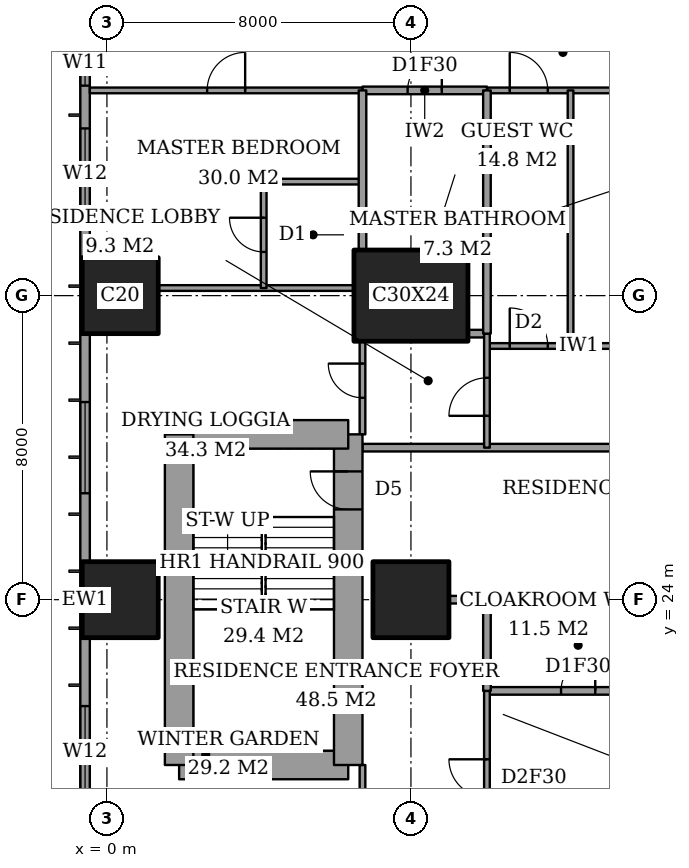
"""IFC4 building model, lengths in metres.
Left out: names, types, materials, properties, quantities, classifications, styles, units other than length and angle.
Written with IfcOpenShell. Run it as: python <this file> out.ifc"""

import sys

from ifc_helpers import new_model, si_unit, direction, frame, frame_2d, origin, origin_2d, place, context, subcontext, project, spatial, rectangle, extrude, element, fill, save


model = new_model("IFC4")
c1 = context("Model", 3, precision=1e-05, world=origin(), true_north=direction((0.0, 1.0)))
c2 = subcontext(c1, "Body", "Model", "MODEL_VIEW")
j1 = project(units=[si_unit("LENGTHUNIT", "METRE"), si_unit("PLANEANGLEUNIT", "RADIAN")], contexts=[c1])
p1 = place(None, origin())
s1 = spatial("IfcSite", under=j1, at=p1, CompositionType="ELEMENT")
p2 = place(p1, origin())
s2 = spatial("IfcBuilding", under=s1, at=p2, CompositionType="ELEMENT")
p3 = place(p2, frame((0.0, 0.0, 135.8)))
s3 = spatial("IfcBuildingStorey", under=s2, at=p3, CompositionType="ELEMENT", Elevation=135.8)
for number, where, z_axis, x_axis in (
    (1, (0.35, 24.0, 0.0), (0.0, 0.0, 1.0), (1.0, 0.0, 0.0)),
    (2, (0.35, 32.0, 0.0), (0.0, 0.0, 1.0), (1.0, 0.0, 0.0)),
    (3, (8.0, 24.0, 0.0), (0.0, 0.0, 1.0), (1.0, 0.0, 0.0)),
):
    element("IfcColumn", number, at=place(p3, frame(where, z_axis=z_axis, x_axis=x_axis)), inside=s3, PredefinedType="COLUMN", context=c2, shape_type="SweptSolid", body=[
        extrude(rectangle(XDim=2.0, YDim=2.0, at=origin_2d()), origin(), (0.0, 0.0, 1.0), 3.6),
    ])
p4 = place(p3, frame((8.0, 32.0, 0.0), z_axis=(0.0, 0.0, 1.0), x_axis=(1.0, 0.0, 0.0)))
e4 = element("IfcColumn", 4, at=p4, inside=s3, PredefinedType="COLUMN", context=c2, shape_type="SweptSolid", body=[
    extrude(rectangle(XDim=3.0, YDim=2.4, at=origin_2d()), origin(), (0.0, 0.0, 1.0), 3.6),
])
p5 = place(p3, frame((1.9, 19.65, 0.0), z_axis=(0.0, 0.0, 1.0), x_axis=(1.0, 0.0, 0.0)))
e5 = element("IfcWall", 5, at=p5, inside=s3, PredefinedType="SHEAR", context=c2, shape_type="SweptSolid", body=[
    extrude(rectangle(XDim=4.45, YDim=0.75, at=frame_2d((2.225, 0.0))), origin(), (0.0, 0.0, 1.0), 3.6),
])
p6 = place(p3, frame((6.35, 19.65, 0.0), z_axis=(0.0, 0.0, 1.0), x_axis=(0.0, 1.0, 0.0)))
e6 = element("IfcWall", 6, at=p6, inside=s3, PredefinedType="SHEAR", context=c2, shape_type="SweptSolid", body=[
    extrude(rectangle(XDim=8.7, YDim=0.75, at=frame_2d((4.35, 0.0))), origin(), (0.0, 0.0, 1.0), 3.6),
])
p7 = place(p6, frame((6.725, 0.0, 0.0)))
e7 = element("IfcOpeningElement", 7, at=p7, cuts=e6, PredefinedType="OPENING", context=c2, shape_type="SweptSolid", body=[
    extrude(rectangle(XDim=1.0, YDim=2.1, at=frame_2d((0.5, 1.05))), frame((0.0, 0.385, 0.0), z_axis=(0.0, -1.0, 0.0), x_axis=(1.0, 0.0, 0.0)), (0.0, 0.0, 1.0), 0.77),
])
p8 = place(p3, frame((6.35, 28.35, 0.0), z_axis=(0.0, 0.0, 1.0), x_axis=(-1.0, 0.0, 0.0)))
e8 = element("IfcWall", 8, at=p8, inside=s3, PredefinedType="SHEAR", context=c2, shape_type="SweptSolid", body=[
    extrude(rectangle(XDim=4.45, YDim=0.75, at=frame_2d((2.225, 0.0))), origin(), (0.0, 0.0, 1.0), 3.6),
])
p9 = place(p3, frame((1.9, 28.35, 0.0), z_axis=(0.0, 0.0, 1.0), x_axis=(0.0, -1.0, 0.0)))
e9 = element("IfcWall", 9, at=p9, inside=s3, PredefinedType="SHEAR", context=c2, shape_type="SweptSolid", body=[
    extrude(rectangle(XDim=8.7, YDim=0.75, at=frame_2d((4.35, 0.0))), origin(), (0.0, 0.0, 1.0), 3.6),
])
p10 = place(p3, frame((-0.575, 44.825, 0.0), z_axis=(0.0, 0.0, 1.0), x_axis=(0.0, -1.0, 0.0)))
e10 = element("IfcWall", 10, at=p10, inside=s3, PredefinedType="SOLIDWALL", context=c2, shape_type="SweptSolid", body=[
    extrude(rectangle(XDim=41.65, YDim=0.25, at=frame_2d((20.825, 0.0))), origin(), (0.0, 0.0, 1.0), 3.6),
])
p11 = place(p10, frame((0.775, 0.0, 0.4)))
e11 = element("IfcOpeningElement", 11, at=p11, cuts=e10, PredefinedType="OPENING", context=c2, shape_type="SweptSolid", body=[
    extrude(rectangle(XDim=2.4, YDim=2.2, at=frame_2d((1.2, 1.1))), frame((0.0, 0.135, 0.0), z_axis=(0.0, -1.0, 0.0), x_axis=(1.0, 0.0, 0.0)), (0.0, 0.0, 1.0), 0.27),
])
p12 = place(p10, frame((6.1, 0.0, 0.4)))
e12 = element("IfcOpeningElement", 12, at=p12, cuts=e10, PredefinedType="OPENING", context=c2, shape_type="SweptSolid", body=[
    extrude(rectangle(XDim=1.2, YDim=2.2, at=frame_2d((0.6, 1.1))), frame((0.0, 0.135, 0.0), z_axis=(0.0, -1.0, 0.0), x_axis=(1.0, 0.0, 0.0)), (0.0, 0.0, 1.0), 0.27),
])
p13 = place(p10, frame((8.425, 0.0, 0.4)))
e13 = element("IfcOpeningElement", 13, at=p13, cuts=e10, PredefinedType="OPENING", context=c2, shape_type="SweptSolid", body=[
    extrude(rectangle(XDim=2.4, YDim=2.2, at=frame_2d((1.2, 1.1))), frame((0.0, 0.135, 0.0), z_axis=(0.0, -1.0, 0.0), x_axis=(1.0, 0.0, 0.0)), (0.0, 0.0, 1.0), 0.27),
])
p14 = place(p10, frame((15.625, 0.0, 0.4)))
e14 = element("IfcOpeningElement", 14, at=p14, cuts=e10, PredefinedType="OPENING", context=c2, shape_type="SweptSolid", body=[
    extrude(rectangle(XDim=2.4, YDim=2.2, at=frame_2d((1.2, 1.1))), frame((0.0, 0.135, 0.0), z_axis=(0.0, -1.0, 0.0), x_axis=(1.0, 0.0, 0.0)), (0.0, 0.0, 1.0), 0.27),
])
p15 = place(p10, frame((23.625, 0.0, 0.4)))
e15 = element("IfcOpeningElement", 15, at=p15, cuts=e10, PredefinedType="OPENING", context=c2, shape_type="SweptSolid", body=[
    extrude(rectangle(XDim=2.4, YDim=2.2, at=frame_2d((1.2, 1.1))), frame((0.0, 0.135, 0.0), z_axis=(0.0, -1.0, 0.0), x_axis=(1.0, 0.0, 0.0)), (0.0, 0.0, 1.0), 0.27),
])
p16 = place(p10, frame((30.825, 0.0, 0.4)))
e16 = element("IfcOpeningElement", 16, at=p16, cuts=e10, PredefinedType="OPENING", context=c2, shape_type="SweptSolid", body=[
    extrude(rectangle(XDim=2.4, YDim=2.2, at=frame_2d((1.2, 1.1))), frame((0.0, 0.135, 0.0), z_axis=(0.0, -1.0, 0.0), x_axis=(1.0, 0.0, 0.0)), (0.0, 0.0, 1.0), 0.27),
])
p17 = place(p10, frame((34.5, 0.0, 0.4)))
e17 = element("IfcOpeningElement", 17, at=p17, cuts=e10, PredefinedType="OPENING", context=c2, shape_type="SweptSolid", body=[
    extrude(rectangle(XDim=1.2, YDim=2.2, at=frame_2d((0.6, 1.1))), frame((0.0, 0.135, 0.0), z_axis=(0.0, -1.0, 0.0), x_axis=(1.0, 0.0, 0.0)), (0.0, 0.0, 1.0), 0.27),
])
p18 = place(p10, frame((38.475, 0.0, 0.4)))
e18 = element("IfcOpeningElement", 18, at=p18, cuts=e10, PredefinedType="OPENING", context=c2, shape_type="SweptSolid", body=[
    extrude(rectangle(XDim=2.4, YDim=2.2, at=frame_2d((1.2, 1.1))), frame((0.0, 0.135, 0.0), z_axis=(0.0, -1.0, 0.0), x_axis=(1.0, 0.0, 0.0)), (0.0, 0.0, 1.0), 0.27),
])
p19 = place(p3, frame((10.0, 21.6, 0.0), z_axis=(0.0, 0.0, 1.0), x_axis=(1.0, 0.0, 0.0)))
e19 = element("IfcWall", 19, at=p19, inside=s3, PredefinedType="PARTITIONING", context=c2, shape_type="SweptSolid", body=[
    extrude(rectangle(XDim=4.8, YDim=0.2, at=frame_2d((2.4, 0.0))), origin(), (0.0, 0.0, 1.0), 3.35),
])
p20 = place(p19, frame((1.95, 0.0, 0.0)))
e20 = element("IfcOpeningElement", 20, at=p20, cuts=e19, PredefinedType="OPENING", context=c2, shape_type="SweptSolid", body=[
    extrude(rectangle(XDim=0.9, YDim=2.1, at=frame_2d((0.45, 1.05))), frame((0.0, 0.11, 0.0), z_axis=(0.0, -1.0, 0.0), x_axis=(1.0, 0.0, 0.0)), (0.0, 0.0, 1.0), 0.22),
])
p21 = place(p3, frame((9.0, 24.0, 0.0), z_axis=(0.0, 0.0, 1.0), x_axis=(1.0, 0.0, 0.0)))
e21 = element("IfcWall", 21, at=p21, inside=s3, PredefinedType="PARTITIONING", context=c2, shape_type="SweptSolid", body=[
    extrude(rectangle(XDim=6.0, YDim=0.2, at=frame_2d((3.0, 0.0))), origin(), (0.0, 0.0, 1.0), 3.35),
])
p22 = place(p3, frame((6.725, 28.0, 0.0), z_axis=(0.0, 0.0, 1.0), x_axis=(1.0, 0.0, 0.0)))
e22 = element("IfcWall", 22, at=p22, inside=s3, PredefinedType="PARTITIONING", context=c2, shape_type="SweptSolid", body=[
    extrude(rectangle(XDim=17.275, YDim=0.2, at=frame_2d((8.637, 0.0))), origin(), (0.0, 0.0, 1.0), 3.35),
])
p23 = place(p22, frame((6.675, 0.0, 0.0)))
e23 = element("IfcOpeningElement", 23, at=p23, cuts=e22, PredefinedType="OPENING", context=c2, shape_type="SweptSolid", body=[
    extrude(rectangle(XDim=1.2, YDim=2.4, at=frame_2d((0.6, 1.2))), frame((0.0, 0.11, 0.0), z_axis=(0.0, -1.0, 0.0), x_axis=(1.0, 0.0, 0.0)), (0.0, 0.0, 1.0), 0.22),
])
p24 = place(p3, frame((10.0, 30.675, 0.0), z_axis=(0.0, 0.0, 1.0), x_axis=(1.0, 0.0, 0.0)))
e24 = element("IfcWall", 24, at=p24, inside=s3, PredefinedType="PARTITIONING", context=c2, shape_type="SweptSolid", body=[
    extrude(rectangle(XDim=4.4, YDim=0.15, at=frame_2d((2.2, 0.0))), origin(), (0.0, 0.0, 1.0), 3.35),
])
p25 = place(p24, frame((0.6, 0.0, 0.0)))
e25 = element("IfcOpeningElement", 25, at=p25, cuts=e24, PredefinedType="OPENING", context=c2, shape_type="SweptSolid", body=[
    extrude(rectangle(XDim=1.0, YDim=2.1, at=frame_2d((0.5, 1.05))), frame((0.0, 0.085, 0.0), z_axis=(0.0, -1.0, 0.0), x_axis=(1.0, 0.0, 0.0)), (0.0, 0.0, 1.0), 0.17),
])
p26 = place(p3, frame((9.5, 31.0, 0.0), z_axis=(0.0, 0.0, 1.0), x_axis=(1.0, 0.0, 0.0)))
e26 = element("IfcWall", 26, at=p26, inside=s3, PredefinedType="PARTITIONING", context=c2, shape_type="SweptSolid", body=[
    extrude(rectangle(XDim=0.5, YDim=0.2, at=frame_2d((0.25, 0.0))), origin(), (0.0, 0.0, 1.0), 3.35),
])
p27 = place(p3, frame((1.35, 32.2, 0.0), z_axis=(0.0, 0.0, 1.0), x_axis=(1.0, 0.0, 0.0)))
e27 = element("IfcWall", 27, at=p27, inside=s3, PredefinedType="PARTITIONING", context=c2, shape_type="SweptSolid", body=[
    extrude(rectangle(XDim=5.15, YDim=0.15, at=frame_2d((2.575, 0.0))), origin(), (0.0, 0.0, 1.0), 3.35),
])
p28 = place(p3, frame((4.125, 35.0, 0.0), z_axis=(0.0, 0.0, 1.0), x_axis=(1.0, 0.0, 0.0)))
e28 = element("IfcWall", 28, at=p28, inside=s3, PredefinedType="PARTITIONING", context=c2, shape_type="SweptSolid", body=[
    extrude(rectangle(XDim=2.6, YDim=0.15, at=frame_2d((1.3, 0.0))), origin(), (0.0, 0.0, 1.0), 3.35),
])
p29 = place(p3, frame((6.725, 37.4, 0.0), z_axis=(0.0, 0.0, 1.0), x_axis=(1.0, 0.0, 0.0)))
e29 = element("IfcWall", 29, at=p29, inside=s3, PredefinedType="PARTITIONING", context=c2, shape_type="SweptSolid", body=[
    extrude(rectangle(XDim=3.275, YDim=0.2, at=frame_2d((1.637, 0.0))), origin(), (0.0, 0.0, 1.0), 3.35),
])
p30 = place(p29, frame((1.188, 0.0, 0.0)))
e30 = element("IfcOpeningElement", 30, at=p30, cuts=e29, PredefinedType="OPENING", context=c2, shape_type="SweptSolid", body=[
    extrude(rectangle(XDim=0.9, YDim=2.1, at=frame_2d((0.45, 1.05))), frame((0.0, 0.11, 0.0), z_axis=(0.0, -1.0, 0.0), x_axis=(1.0, 0.0, 0.0)), (0.0, 0.0, 1.0), 0.22),
])
p31 = place(p3, frame((-0.45, 37.4, 0.0), z_axis=(0.0, 0.0, 1.0), x_axis=(1.0, 0.0, 0.0)))
e31 = element("IfcWall", 31, at=p31, inside=s3, PredefinedType="PARTITIONING", context=c2, shape_type="SweptSolid", body=[
    extrude(rectangle(XDim=7.175, YDim=0.15, at=frame_2d((3.587, 0.0))), origin(), (0.0, 0.0, 1.0), 3.35),
])
p32 = place(p31, frame((3.087, 0.0, 0.0)))
e32 = element("IfcOpeningElement", 32, at=p32, cuts=e31, PredefinedType="OPENING", context=c2, shape_type="SweptSolid", body=[
    extrude(rectangle(XDim=1.0, YDim=2.1, at=frame_2d((0.5, 1.05))), frame((0.0, 0.085, 0.0), z_axis=(0.0, -1.0, 0.0), x_axis=(1.0, 0.0, 0.0)), (0.0, 0.0, 1.0), 0.17),
])
p33 = place(p3, frame((10.0, 37.4, 0.0), z_axis=(0.0, 0.0, 1.0), x_axis=(1.0, 0.0, 0.0)))
e33 = element("IfcWall", 33, at=p33, inside=s3, PredefinedType="PARTITIONING", context=c2, shape_type="SweptSolid", body=[
    extrude(rectangle(XDim=14.561, YDim=0.15, at=frame_2d((7.281, 0.0))), origin(), (0.0, 0.0, 1.0), 3.35),
])
p34 = place(p33, frame((0.6, 0.0, 0.0)))
e34 = element("IfcOpeningElement", 34, at=p34, cuts=e33, PredefinedType="OPENING", context=c2, shape_type="SweptSolid", body=[
    extrude(rectangle(XDim=1.0, YDim=2.1, at=frame_2d((0.5, 1.05))), frame((0.0, 0.085, 0.0), z_axis=(0.0, -1.0, 0.0), x_axis=(1.0, 0.0, 0.0)), (0.0, 0.0, 1.0), 0.17),
])
p35 = place(p33, frame((4.6, 0.0, 0.0)))
e35 = element("IfcOpeningElement", 35, at=p35, cuts=e33, PredefinedType="OPENING", context=c2, shape_type="SweptSolid", body=[
    extrude(rectangle(XDim=1.0, YDim=2.1, at=frame_2d((0.5, 1.05))), frame((0.0, 0.085, 0.0), z_axis=(0.0, -1.0, 0.0), x_axis=(1.0, 0.0, 0.0)), (0.0, 0.0, 1.0), 0.17),
])
p36 = place(p33, frame((10.725, 0.0, 0.0)))
e36 = element("IfcOpeningElement", 36, at=p36, cuts=e33, PredefinedType="OPENING", context=c2, shape_type="SweptSolid", body=[
    extrude(rectangle(XDim=1.0, YDim=2.1, at=frame_2d((0.5, 1.05))), frame((0.0, 0.085, 0.0), z_axis=(0.0, -1.0, 0.0), x_axis=(1.0, 0.0, 0.0)), (0.0, 0.0, 1.0), 0.17),
])
p37 = place(p3, frame((4.125, 32.2, 0.0), z_axis=(0.0, 0.0, 1.0), x_axis=(0.0, 1.0, 0.0)))
e37 = element("IfcWall", 37, at=p37, inside=s3, PredefinedType="PARTITIONING", context=c2, shape_type="SweptSolid", body=[
    extrude(rectangle(XDim=2.8, YDim=0.15, at=frame_2d((1.4, 0.0))), origin(), (0.0, 0.0, 1.0), 3.35),
])
p38 = place(p37, frame((0.95, 0.0, 0.0)))
e38 = element("IfcOpeningElement", 38, at=p38, cuts=e37, PredefinedType="OPENING", context=c2, shape_type="SweptSolid", body=[
    extrude(rectangle(XDim=0.9, YDim=2.1, at=frame_2d((0.45, 1.05))), frame((0.0, 0.085, 0.0), z_axis=(0.0, -1.0, 0.0), x_axis=(1.0, 0.0, 0.0)), (0.0, 0.0, 1.0), 0.17),
])
p39 = place(p3, frame((6.725, 33.2, 0.0), z_axis=(0.0, 0.0, 1.0), x_axis=(0.0, 1.0, 0.0)))
e39 = element("IfcWall", 39, at=p39, inside=s3, PredefinedType="PARTITIONING", context=c2, shape_type="SweptSolid", body=[
    extrude(rectangle(XDim=4.2, YDim=0.2, at=frame_2d((2.1, 0.0))), origin(), (0.0, 0.0, 1.0), 3.35),
])
p40 = place(p3, frame((6.725, 17.2, 0.0), z_axis=(0.0, 0.0, 1.0), x_axis=(0.0, 1.0, 0.0)))
e40 = element("IfcWall", 40, at=p40, inside=s3, PredefinedType="PARTITIONING", context=c2, shape_type="SweptSolid", body=[
    extrude(rectangle(XDim=2.45, YDim=0.15, at=frame_2d((1.225, 0.0))), origin(), (0.0, 0.0, 1.0), 3.35),
])
p41 = place(p40, frame((0.538, 0.0, 0.0)))
e41 = element("IfcOpeningElement", 41, at=p41, cuts=e40, PredefinedType="OPENING", context=c2, shape_type="SweptSolid", body=[
    extrude(rectangle(XDim=1.0, YDim=2.1, at=frame_2d((0.5, 1.05))), frame((0.0, 0.085, 0.0), z_axis=(0.0, -1.0, 0.0), x_axis=(1.0, 0.0, 0.0)), (0.0, 0.0, 1.0), 0.17),
])
p42 = place(p3, frame((6.725, 28.35, 0.0), z_axis=(0.0, 0.0, 1.0), x_axis=(0.0, 1.0, 0.0)))
e42 = element("IfcWall", 42, at=p42, inside=s3, PredefinedType="PARTITIONING", context=c2, shape_type="SweptSolid", body=[
    extrude(rectangle(XDim=2.45, YDim=0.15, at=frame_2d((1.225, 0.0))), origin(), (0.0, 0.0, 1.0), 3.35),
])
p43 = place(p42, frame((0.962, 0.0, 0.0)))
e43 = element("IfcOpeningElement", 43, at=p43, cuts=e42, PredefinedType="OPENING", context=c2, shape_type="SweptSolid", body=[
    extrude(rectangle(XDim=0.9, YDim=2.1, at=frame_2d((0.45, 1.05))), frame((0.0, 0.085, 0.0), z_axis=(0.0, -1.0, 0.0), x_axis=(1.0, 0.0, 0.0)), (0.0, 0.0, 1.0), 0.17),
])
p44 = place(p3, frame((10.0, 21.6, 0.0), z_axis=(0.0, 0.0, 1.0), x_axis=(0.0, 1.0, 0.0)))
e44 = element("IfcWall", 44, at=p44, inside=s3, PredefinedType="PARTITIONING", context=c2, shape_type="SweptSolid", body=[
    extrude(rectangle(XDim=2.4, YDim=0.2, at=frame_2d((1.2, 0.0))), origin(), (0.0, 0.0, 1.0), 3.35),
])
p45 = place(p3, frame((10.0, 31.0, 0.0), z_axis=(0.0, 0.0, 1.0), x_axis=(0.0, 1.0, 0.0)))
e45 = element("IfcWall", 45, at=p45, inside=s3, PredefinedType="PARTITIONING", context=c2, shape_type="SweptSolid", body=[
    extrude(rectangle(XDim=6.4, YDim=0.2, at=frame_2d((3.2, 0.0))), origin(), (0.0, 0.0, 1.0), 3.35),
])
p46 = place(p3, frame((10.0, 10.6, 0.0), z_axis=(0.0, 0.0, 1.0), x_axis=(0.0, 1.0, 0.0)))
e46 = element("IfcWall", 46, at=p46, inside=s3, PredefinedType="PARTITIONING", context=c2, shape_type="SweptSolid", body=[
    extrude(rectangle(XDim=11.0, YDim=0.15, at=frame_2d((5.5, 0.0))), origin(), (0.0, 0.0, 1.0), 3.35),
])
p47 = place(p46, frame((8.2, 0.0, 0.0)))
e47 = element("IfcOpeningElement", 47, at=p47, cuts=e46, PredefinedType="OPENING", context=c2, shape_type="SweptSolid", body=[
    extrude(rectangle(XDim=1.0, YDim=2.1, at=frame_2d((0.5, 1.05))), frame((0.0, 0.085, 0.0), z_axis=(0.0, -1.0, 0.0), x_axis=(1.0, 0.0, 0.0)), (0.0, 0.0, 1.0), 0.17),
])
p48 = place(p3, frame((10.0, 28.0, 0.0), z_axis=(0.0, 0.0, 1.0), x_axis=(0.0, 1.0, 0.0)))
e48 = element("IfcWall", 48, at=p48, inside=s3, PredefinedType="PARTITIONING", context=c2, shape_type="SweptSolid", body=[
    extrude(rectangle(XDim=3.0, YDim=0.15, at=frame_2d((1.5, 0.0))), origin(), (0.0, 0.0, 1.0), 3.35),
])
p49 = place(p48, frame((0.837, 0.0, 0.0)))
e49 = element("IfcOpeningElement", 49, at=p49, cuts=e48, PredefinedType="OPENING", context=c2, shape_type="SweptSolid", body=[
    extrude(rectangle(XDim=1.0, YDim=2.1, at=frame_2d((0.5, 1.05))), frame((0.0, 0.085, 0.0), z_axis=(0.0, -1.0, 0.0), x_axis=(1.0, 0.0, 0.0)), (0.0, 0.0, 1.0), 0.17),
])
p50 = place(p3, frame((12.2, 30.675, 0.0), z_axis=(0.0, 0.0, 1.0), x_axis=(0.0, 1.0, 0.0)))
e50 = element("IfcWall", 50, at=p50, inside=s3, PredefinedType="PARTITIONING", context=c2, shape_type="SweptSolid", body=[
    extrude(rectangle(XDim=6.725, YDim=0.15, at=frame_2d((3.362, 0.0))), origin(), (0.0, 0.0, 1.0), 3.35),
])
p51 = place(p12, origin())
e51 = element("IfcWindow", 51, at=p51, inside=s3, PartitioningType="SINGLE_PANEL", PredefinedType="WINDOW", context=c2, shape_type="SweptSolid", body=[
    extrude(rectangle(XDim=1.2, YDim=2.2, at=frame_2d((0.6, 1.1))), frame((0.0, 0.03, 0.0), z_axis=(0.0, -1.0, 0.0), x_axis=(1.0, 0.0, 0.0)), (0.0, 0.0, 1.0), 0.06),
])
fill(e12, e51)
p52 = place(p13, origin())
e52 = element("IfcWindow", 52, at=p52, inside=s3, PartitioningType="SINGLE_PANEL", PredefinedType="WINDOW", context=c2, shape_type="SweptSolid", body=[
    extrude(rectangle(XDim=2.4, YDim=2.2, at=frame_2d((1.2, 1.1))), frame((0.0, 0.03, 0.0), z_axis=(0.0, -1.0, 0.0), x_axis=(1.0, 0.0, 0.0)), (0.0, 0.0, 1.0), 0.06),
])
fill(e13, e52)
p53 = place(p14, origin())
e53 = element("IfcWindow", 53, at=p53, inside=s3, PartitioningType="SINGLE_PANEL", PredefinedType="WINDOW", context=c2, shape_type="SweptSolid", body=[
    extrude(rectangle(XDim=2.4, YDim=2.2, at=frame_2d((1.2, 1.1))), frame((0.0, 0.03, 0.0), z_axis=(0.0, -1.0, 0.0), x_axis=(1.0, 0.0, 0.0)), (0.0, 0.0, 1.0), 0.06),
])
fill(e14, e53)
p54 = place(p15, origin())
e54 = element("IfcWindow", 54, at=p54, inside=s3, PartitioningType="SINGLE_PANEL", PredefinedType="WINDOW", context=c2, shape_type="SweptSolid", body=[
    extrude(rectangle(XDim=2.4, YDim=2.2, at=frame_2d((1.2, 1.1))), frame((0.0, 0.03, 0.0), z_axis=(0.0, -1.0, 0.0), x_axis=(1.0, 0.0, 0.0)), (0.0, 0.0, 1.0), 0.06),
])
fill(e15, e54)
p55 = place(p47, origin())
e55 = element("IfcDoor", 55, at=p55, inside=s3, OperationType="SINGLE_SWING_LEFT", PredefinedType="DOOR", context=c2, shape_type="SweptSolid", body=[
    extrude(rectangle(XDim=1.0, YDim=2.1, at=frame_2d((0.5, 1.05))), frame((0.0, 0.025, 0.0), z_axis=(0.0, -1.0, 0.0), x_axis=(1.0, 0.0, 0.0)), (0.0, 0.0, 1.0), 0.05),
])
fill(e47, e55)
p56 = place(p20, origin())
e56 = element("IfcDoor", 56, at=p56, inside=s3, OperationType="SINGLE_SWING_LEFT", PredefinedType="DOOR", context=c2, shape_type="SweptSolid", body=[
    extrude(rectangle(XDim=0.9, YDim=2.1, at=frame_2d((0.45, 1.05))), frame((0.0, 0.025, 0.0), z_axis=(0.0, -1.0, 0.0), x_axis=(1.0, 0.0, 0.0)), (0.0, 0.0, 1.0), 0.05),
])
fill(e20, e56)
p57 = place(p34, origin())
e57 = element("IfcDoor", 57, at=p57, inside=s3, OperationType="SINGLE_SWING_RIGHT", PredefinedType="DOOR", context=c2, shape_type="SweptSolid", body=[
    extrude(rectangle(XDim=1.0, YDim=2.1, at=frame_2d((0.5, 1.05))), frame((0.0, 0.025, 0.0), z_axis=(0.0, -1.0, 0.0), x_axis=(1.0, 0.0, 0.0)), (0.0, 0.0, 1.0), 0.05),
])
fill(e34, e57)
p58 = place(p38, origin())
e58 = element("IfcDoor", 58, at=p58, inside=s3, OperationType="SINGLE_SWING_LEFT", PredefinedType="DOOR", context=c2, shape_type="SweptSolid", body=[
    extrude(rectangle(XDim=0.9, YDim=2.1, at=frame_2d((0.45, 1.05))), frame((0.0, 0.025, 0.0), z_axis=(0.0, -1.0, 0.0), x_axis=(1.0, 0.0, 0.0)), (0.0, 0.0, 1.0), 0.05),
])
fill(e38, e58)
p59 = place(p32, origin())
e59 = element("IfcDoor", 59, at=p59, inside=s3, OperationType="SINGLE_SWING_LEFT", PredefinedType="DOOR", context=c2, shape_type="SweptSolid", body=[
    extrude(rectangle(XDim=1.0, YDim=2.1, at=frame_2d((0.5, 1.05))), frame((0.0, 0.025, 0.0), z_axis=(0.0, -1.0, 0.0), x_axis=(1.0, 0.0, 0.0)), (0.0, 0.0, 1.0), 0.05),
])
fill(e32, e59)
p60 = place(p43, origin())
e60 = element("IfcDoor", 60, at=p60, inside=s3, OperationType="SINGLE_SWING_LEFT", PredefinedType="DOOR", context=c2, shape_type="SweptSolid", body=[
    extrude(rectangle(XDim=0.9, YDim=2.1, at=frame_2d((0.45, 1.05))), frame((0.0, 0.025, 0.0), z_axis=(0.0, -1.0, 0.0), x_axis=(1.0, 0.0, 0.0)), (0.0, 0.0, 1.0), 0.05),
])
fill(e43, e60)
p61 = place(p30, origin())
e61 = element("IfcDoor", 61, at=p61, inside=s3, OperationType="SINGLE_SWING_LEFT", PredefinedType="DOOR", context=c2, shape_type="SweptSolid", body=[
    extrude(rectangle(XDim=0.9, YDim=2.1, at=frame_2d((0.45, 1.05))), frame((0.0, 0.025, 0.0), z_axis=(0.0, -1.0, 0.0), x_axis=(1.0, 0.0, 0.0)), (0.0, 0.0, 1.0), 0.05),
])
fill(e30, e61)
p62 = place(p49, origin())
e62 = element("IfcDoor", 62, at=p62, inside=s3, OperationType="SINGLE_SWING_RIGHT", PredefinedType="DOOR", context=c2, shape_type="SweptSolid", body=[
    extrude(rectangle(XDim=1.0, YDim=2.1, at=frame_2d((0.5, 1.05))), frame((0.0, 0.025, 0.0), z_axis=(0.0, -1.0, 0.0), x_axis=(1.0, 0.0, 0.0)), (0.0, 0.0, 1.0), 0.05),
])
fill(e49, e62)
p63 = place(p25, origin())
e63 = element("IfcDoor", 63, at=p63, inside=s3, OperationType="SINGLE_SWING_RIGHT", PredefinedType="DOOR", context=c2, shape_type="SweptSolid", body=[
    extrude(rectangle(XDim=1.0, YDim=2.1, at=frame_2d((0.5, 1.05))), frame((0.0, 0.025, 0.0), z_axis=(0.0, -1.0, 0.0), x_axis=(1.0, 0.0, 0.0)), (0.0, 0.0, 1.0), 0.05),
])
fill(e25, e63)
p64 = place(p7, origin())
e64 = element("IfcDoor", 64, at=p64, inside=s3, OperationType="SINGLE_SWING_LEFT", PredefinedType="DOOR", context=c2, shape_type="SweptSolid", body=[
    extrude(rectangle(XDim=1.0, YDim=2.1, at=frame_2d((0.5, 1.05))), frame((0.0, 0.025, 0.0), z_axis=(0.0, -1.0, 0.0), x_axis=(1.0, 0.0, 0.0)), (0.0, 0.0, 1.0), 0.05),
])
fill(e7, e64)
save(model, sys.argv[1])
